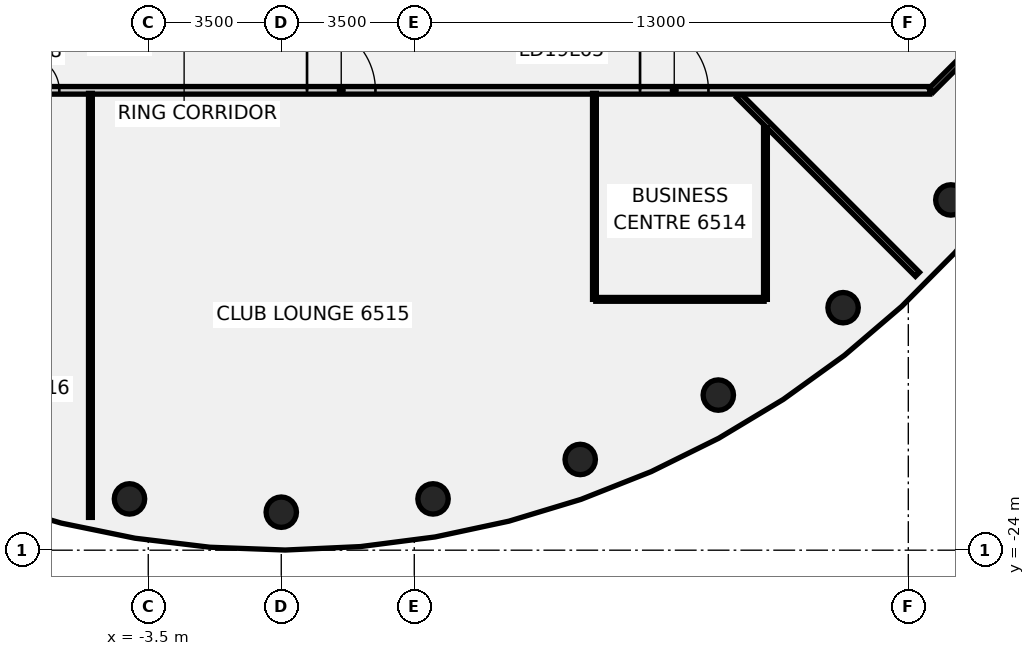
"""IFC4 building model, lengths in metres.
Left out: names, types, materials, properties, quantities, classifications, styles, units other than length and angle.
Written with IfcOpenShell. Run it as: python <this file> out.ifc"""

import sys

from ifc_helpers import new_model, si_unit, direction, frame, frame_2d, origin, origin_2d, place, context, subcontext, project, spatial, rectangle, circle, extrude, element, fill, save


model = new_model("IFC4")
c1 = context("Model", 3, precision=1e-05, world=origin(), true_north=direction((0.0, 1.0)))
c2 = subcontext(c1, "Body", "Model", "MODEL_VIEW")
j1 = project(units=[si_unit("LENGTHUNIT", "METRE"), si_unit("PLANEANGLEUNIT", "RADIAN")], contexts=[c1])
p1 = place(None, origin())
s1 = spatial("IfcSite", under=j1, at=p1, CompositionType="ELEMENT")
p2 = place(p1, origin())
s2 = spatial("IfcBuilding", under=s1, at=p2, CompositionType="ELEMENT")
p3 = place(p2, frame((0.0, 0.0, 256.8)))
s3 = spatial("IfcBuildingStorey", under=s2, at=p3, CompositionType="ELEMENT", Elevation=256.8)
for number, where, z_axis, x_axis in (
    (1, (-3.994, -22.651, -0.14), (0.0, 0.0, 1.0), (1.0, 0.0, 0.0)),
    (2, (0.0, -23.0, -0.14), (0.0, 0.0, 1.0), (1.0, 0.0, 0.0)),
    (3, (3.994, -22.651, -0.14), (0.0, 0.0, 1.0), (1.0, 0.0, 0.0)),
    (4, (7.866, -21.613, -0.14), (0.0, 0.0, 1.0), (1.0, 0.0, 0.0)),
    (5, (11.5, -19.919, -0.14), (0.0, 0.0, 1.0), (1.0, 0.0, 0.0)),
    (6, (14.784, -17.619, -0.14), (0.0, 0.0, 1.0), (1.0, 0.0, 0.0)),
    (7, (17.619, -14.784, -0.14), (0.0, 0.0, 1.0), (1.0, 0.0, 0.0)),
):
    element("IfcColumn", number, at=place(p3, frame(where, z_axis=z_axis, x_axis=x_axis)), inside=s3, PredefinedType="COLUMN", context=c2, shape_type="SweptSolid", body=[
        extrude(circle(Radius=0.4, at=origin_2d()), origin(), (0.0, 0.0, 1.0), 3.6),
    ])
p4 = place(p3, frame((12.034, -12.034, 0.0), z_axis=(0.0, 0.0, 1.0), x_axis=(0.707106781187, -0.707106781187, 0.0)))
e8 = element("IfcWall", 8, at=p4, inside=s3, PredefinedType="PARTITIONING", context=c2, shape_type="SweptSolid", body=[
    extrude(rectangle(XDim=6.655, YDim=0.15, at=frame_2d((3.328, 0.0))), origin(), (0.0, 0.0, 1.0), 2.864),
])
p5 = place(p3, frame((-17.1, -11.9, 0.0), z_axis=(0.0, 0.0, 1.0), x_axis=(1.0, 0.0, 0.0)))
e9 = element("IfcWall", 9, at=p5, inside=s3, PredefinedType="PARTITIONING", context=c2, shape_type="SweptSolid", body=[
    extrude(rectangle(XDim=34.165, YDim=0.2, at=frame_2d((17.083, 0.0))), origin(), (0.0, 0.0, 1.0), 2.864),
])
p6 = place(p5, frame((6.1, 0.0, 0.0)))
e10 = element("IfcOpeningElement", 10, at=p6, cuts=e9, PredefinedType="OPENING", context=c2, shape_type="SweptSolid", body=[
    extrude(rectangle(XDim=0.9, YDim=2.1, at=frame_2d((0.45, 1.05))), frame((0.0, 0.11, 0.0), z_axis=(0.0, -1.0, 0.0), x_axis=(1.0, 0.0, 0.0)), (0.0, 0.0, 1.0), 0.22),
])
p7 = place(p5, frame((26.541, 0.0, 0.0)))
e11 = element("IfcOpeningElement", 11, at=p7, cuts=e9, PredefinedType="OPENING", context=c2, shape_type="SweptSolid", body=[
    extrude(rectangle(XDim=1.8, YDim=2.1, at=frame_2d((0.9, 1.05))), frame((0.0, 0.11, 0.0), z_axis=(0.0, -1.0, 0.0), x_axis=(1.0, 0.0, 0.0)), (0.0, 0.0, 1.0), 0.22),
])
p8 = place(p5, frame((17.778, 0.0, 0.0)))
e12 = element("IfcOpeningElement", 12, at=p8, cuts=e9, PredefinedType="OPENING", context=c2, shape_type="SweptSolid", body=[
    extrude(rectangle(XDim=1.8, YDim=2.1, at=frame_2d((0.9, 1.05))), frame((0.0, 0.11, 0.0), z_axis=(0.0, -1.0, 0.0), x_axis=(1.0, 0.0, 0.0)), (0.0, 0.0, 1.0), 0.22),
])
p9 = place(p5, frame((10.359, 0.0, 0.0)))
e13 = element("IfcOpeningElement", 13, at=p9, cuts=e9, PredefinedType="OPENING", context=c2, shape_type="SweptSolid", body=[
    extrude(rectangle(XDim=0.9, YDim=2.1, at=frame_2d((0.45, 1.05))), frame((0.0, 0.11, 0.0), z_axis=(0.0, -1.0, 0.0), x_axis=(1.0, 0.0, 0.0)), (0.0, 0.0, 1.0), 0.22),
])
p10 = place(p5, frame((1.65, 0.0, 0.0)))
e14 = element("IfcOpeningElement", 14, at=p10, cuts=e9, PredefinedType="OPENING", context=c2, shape_type="SweptSolid", body=[
    extrude(rectangle(XDim=0.9, YDim=2.1, at=frame_2d((0.45, 1.05))), frame((0.0, 0.11, 0.0), z_axis=(0.0, -1.0, 0.0), x_axis=(1.0, 0.0, 0.0)), (0.0, 0.0, 1.0), 0.22),
])
p11 = place(p3, frame((8.276, -17.4, 0.0), z_axis=(0.0, 0.0, 1.0), x_axis=(1.0, 0.0, 0.0)))
e15 = element("IfcWall", 15, at=p11, inside=s3, PredefinedType="PARTITIONING", context=c2, shape_type="SweptSolid", body=[
    extrude(rectangle(XDim=4.43, YDim=0.1, at=frame_2d((2.215, 0.0))), origin(), (0.0, 0.0, 1.0), 2.864),
])
p12 = place(p3, frame((17.1, -11.9, 0.0), z_axis=(0.0, 0.0, 1.0), x_axis=(0.707106781187, 0.707106781187, 0.0)))
e16 = element("IfcWall", 16, at=p12, inside=s3, PredefinedType="PARTITIONING", context=c2, shape_type="SweptSolid", body=[
    extrude(rectangle(XDim=2.505, YDim=0.15, at=frame_2d((1.253, 0.0))), origin(), (0.0, 0.0, 1.0), 2.864),
])
p13 = place(p3, frame((-5.022, -23.137, 0.0), z_axis=(0.0, 0.0, 1.0), x_axis=(0.0, 1.0, 0.0)))
e17 = element("IfcWall", 17, at=p13, inside=s3, PredefinedType="PARTITIONING", context=c2, shape_type="SweptSolid", body=[
    extrude(rectangle(XDim=11.157, YDim=0.1, at=frame_2d((5.579, 0.0))), origin(), (0.0, 0.0, 1.0), 2.864),
])
p14 = place(p3, frame((8.241, -17.4, 0.0), z_axis=(0.0, 0.0, 1.0), x_axis=(0.0, 1.0, 0.0)))
e18 = element("IfcWall", 18, at=p14, inside=s3, PredefinedType="PARTITIONING", context=c2, shape_type="SweptSolid", body=[
    extrude(rectangle(XDim=5.42, YDim=0.1, at=frame_2d((2.71, 0.0))), origin(), (0.0, 0.0, 1.0), 2.864),
])
p15 = place(p3, frame((12.741, -17.4, 0.0), z_axis=(0.0, 0.0, 1.0), x_axis=(0.0, 1.0, 0.0)))
e19 = element("IfcWall", 19, at=p15, inside=s3, PredefinedType="PARTITIONING", context=c2, shape_type="SweptSolid", body=[
    extrude(rectangle(XDim=4.519, YDim=0.1, at=frame_2d((2.259, 0.0))), origin(), (0.0, 0.0, 1.0), 2.864),
])
p16 = place(p7, frame((1.8, 0.0, 0.0), z_axis=(0.0, 0.0, 1.0), x_axis=(-1.0, 0.0, 0.0)))
e20 = element("IfcDoor", 20, at=p16, inside=s3, OperationType="DOUBLE_DOOR_SINGLE_SWING", PredefinedType="DOOR", context=c2, shape_type="SweptSolid", body=[
    extrude(rectangle(XDim=1.8, YDim=2.1, at=frame_2d((0.9, 1.05))), frame((0.0, 0.025, 0.0), z_axis=(0.0, -1.0, 0.0), x_axis=(1.0, 0.0, 0.0)), (0.0, 0.0, 1.0), 0.05),
])
fill(e11, e20)
p17 = place(p8, origin())
e21 = element("IfcDoor", 21, at=p17, inside=s3, OperationType="DOUBLE_DOOR_SINGLE_SWING", PredefinedType="DOOR", context=c2, shape_type="SweptSolid", body=[
    extrude(rectangle(XDim=1.8, YDim=2.1, at=frame_2d((0.9, 1.05))), frame((0.0, 0.025, 0.0), z_axis=(0.0, -1.0, 0.0), x_axis=(1.0, 0.0, 0.0)), (0.0, 0.0, 1.0), 0.05),
])
fill(e12, e21)
p18 = place(p9, frame((0.9, 0.0, 0.0), z_axis=(0.0, 0.0, 1.0), x_axis=(-1.0, 0.0, 0.0)))
e22 = element("IfcDoor", 22, at=p18, inside=s3, OperationType="SINGLE_SWING_LEFT", PredefinedType="DOOR", context=c2, shape_type="SweptSolid", body=[
    extrude(rectangle(XDim=0.9, YDim=2.1, at=frame_2d((0.45, 1.05))), frame((0.0, 0.025, 0.0), z_axis=(0.0, -1.0, 0.0), x_axis=(1.0, 0.0, 0.0)), (0.0, 0.0, 1.0), 0.05),
])
fill(e13, e22)
save(model, sys.argv[1])
